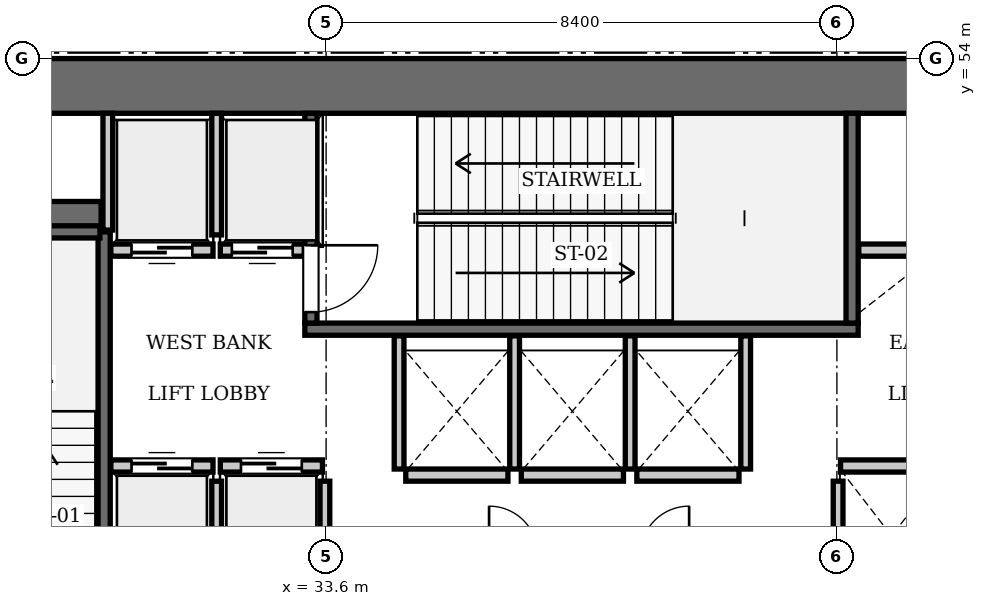
"""IFC4 building model, lengths in metres.
Left out: names, types, materials, properties, quantities, classifications, styles, units other than length and angle.
Written with IfcOpenShell. Run it as: python <this file> out.ifc"""

import sys

from ifc_helpers import new_model, si_unit, direction, frame, frame_2d, origin, place, context, subcontext, project, spatial, rectangle, extrude, element, fill, save


model = new_model("IFC4")
c1 = context("Model", 3, precision=1e-05, world=origin(), true_north=direction((0.0, 1.0)))
c2 = subcontext(c1, "Body", "Model", "MODEL_VIEW")
j1 = project(units=[si_unit("LENGTHUNIT", "METRE"), si_unit("PLANEANGLEUNIT", "RADIAN")], contexts=[c1])
p1 = place(None, origin())
s1 = spatial("IfcSite", under=j1, at=p1, CompositionType="ELEMENT")
p2 = place(p1, origin())
s2 = spatial("IfcBuilding", under=s1, at=p2, CompositionType="ELEMENT")
p3 = place(p2, frame((0.0, 0.0, 10.85)))
s3 = spatial("IfcBuildingStorey", under=s2, at=p3, CompositionType="ELEMENT", Elevation=10.85)
p4 = place(p3, frame((25.2, 53.55, 0.0), z_axis=(0.0, 0.0, 1.0), x_axis=(1.0, 0.0, 0.0)))
e1 = element("IfcWall", 1, at=p4, inside=s3, PredefinedType="SHEAR", context=c2, shape_type="SweptSolid", body=[
    extrude(rectangle(XDim=25.2, YDim=0.9, at=frame_2d((12.6, 0.0))), origin(), (0.0, 0.0, 1.0), 5.6),
])
p5 = place(p3, frame((26.1, 51.4, 0.0), z_axis=(0.0, 0.0, 1.0), x_axis=(1.0, 0.0, 0.0)))
e2 = element("IfcWall", 2, at=p5, inside=s3, PredefinedType="SHEAR", context=c2, shape_type="SweptSolid", body=[
    extrude(rectangle(XDim=3.8, YDim=0.5, at=frame_2d((1.9, 0.0))), origin(), (0.0, 0.0, 1.0), 5.6),
])
p6 = place(p3, frame((29.95, 42.3, 0.0), z_axis=(0.0, 0.0, 1.0), x_axis=(0.0, 1.0, 0.0)))
e3 = element("IfcWall", 3, at=p6, inside=s3, PredefinedType="SOLIDWALL", context=c2, shape_type="SweptSolid", body=[
    extrude(rectangle(XDim=8.85, YDim=0.2, at=frame_2d((4.425, 0.0))), origin(), (0.0, 0.0, 1.0), 5.32),
])
p7 = place(p3, frame((26.38, 51.15, 0.0), z_axis=(0.0, 0.0, 1.0), x_axis=(1.0, 0.0, 0.0)))
e4 = element("IfcWall", 4, at=p7, inside=s3, PredefinedType="SOLIDWALL", context=c2, shape_type="SweptSolid", body=[
    extrude(rectangle(XDim=3.5, YDim=0.2, at=frame_2d((1.75, 0.0))), origin(), (0.0, 0.0, 1.0), 5.32),
])
p8 = place(p3, frame((33.25, 49.55, 0.0), z_axis=(0.0, 0.0, 1.0), x_axis=(1.0, 0.0, 0.0)))
e5 = element("IfcWall", 5, at=p8, inside=s3, PredefinedType="SOLIDWALL", context=c2, shape_type="SweptSolid", body=[
    extrude(rectangle(XDim=9.1, YDim=0.2, at=frame_2d((4.55, 0.0))), origin(), (0.0, 0.0, 1.0), 5.32),
])
p9 = place(p3, frame((42.25, 49.65, 0.0), z_axis=(0.0, 0.0, 1.0), x_axis=(0.0, 1.0, 0.0)))
e6 = element("IfcWall", 6, at=p9, inside=s3, PredefinedType="SOLIDWALL", context=c2, shape_type="SweptSolid", body=[
    extrude(rectangle(XDim=3.45, YDim=0.2, at=frame_2d((1.725, 0.0))), origin(), (0.0, 0.0, 1.0), 5.32),
])
p10 = place(p3, frame((33.35, 49.65, 0.0), z_axis=(0.0, 0.0, 1.0), x_axis=(0.0, 1.0, 0.0)))
e7 = element("IfcWall", 7, at=p10, inside=s3, PredefinedType="SOLIDWALL", context=c2, shape_type="SweptSolid", body=[
    extrude(rectangle(XDim=3.45, YDim=0.2, at=frame_2d((1.725, 0.0))), origin(), (0.0, 0.0, 1.0), 5.32),
])
p11 = place(p10, frame((0.18, 0.0, 0.0)))
e8 = element("IfcOpeningElement", 8, at=p11, cuts=e7, PredefinedType="OPENING", context=c2, shape_type="SweptSolid", body=[
    extrude(rectangle(XDim=1.1, YDim=2.15, at=frame_2d((0.55, 1.075))), frame((0.0, 0.11, 0.0), z_axis=(0.0, -1.0, 0.0), x_axis=(1.0, 0.0, 0.0)), (0.0, 0.0, 1.0), 0.22),
])
p12 = place(p3, frame((30.06, 47.3, 0.0), z_axis=(0.0, 0.0, 1.0), x_axis=(1.0, 0.0, 0.0)))
e9 = element("IfcWall", 9, at=p12, inside=s3, PredefinedType="SOLIDWALL", context=c2, shape_type="SweptSolid", body=[
    extrude(rectangle(XDim=1.68, YDim=0.2, at=frame_2d((0.84, 0.0))), origin(), (0.0, 0.0, 1.0), 5.32),
])
p13 = place(p12, frame((0.34, 0.0, 0.0)))
e10 = element("IfcOpeningElement", 10, at=p13, cuts=e9, PredefinedType="OPENING", context=c2, shape_type="SweptSolid", body=[
    extrude(rectangle(XDim=1.0, YDim=2.15, at=frame_2d((0.5, 1.075))), frame((0.0, 0.11, 0.0), z_axis=(0.0, -1.0, 0.0), x_axis=(1.0, 0.0, 0.0)), (0.0, 0.0, 1.0), 0.22),
])
p14 = place(p3, frame((31.86, 47.3, 0.0), z_axis=(0.0, 0.0, 1.0), x_axis=(1.0, 0.0, 0.0)))
e11 = element("IfcWall", 11, at=p14, inside=s3, PredefinedType="SOLIDWALL", context=c2, shape_type="SweptSolid", body=[
    extrude(rectangle(XDim=1.68, YDim=0.2, at=frame_2d((0.84, 0.0))), origin(), (0.0, 0.0, 1.0), 5.32),
])
p15 = place(p14, frame((0.34, 0.0, 0.0)))
e12 = element("IfcOpeningElement", 12, at=p15, cuts=e11, PredefinedType="OPENING", context=c2, shape_type="SweptSolid", body=[
    extrude(rectangle(XDim=1.0, YDim=2.15, at=frame_2d((0.5, 1.075))), frame((0.0, 0.11, 0.0), z_axis=(0.0, -1.0, 0.0), x_axis=(1.0, 0.0, 0.0)), (0.0, 0.0, 1.0), 0.22),
])
p16 = place(p3, frame((30.06, 50.85, 0.0), z_axis=(0.0, 0.0, 1.0), x_axis=(1.0, 0.0, 0.0)))
e13 = element("IfcWall", 13, at=p16, inside=s3, PredefinedType="SOLIDWALL", context=c2, shape_type="SweptSolid", body=[
    extrude(rectangle(XDim=1.68, YDim=0.2, at=frame_2d((0.84, 0.0))), origin(), (0.0, 0.0, 1.0), 5.32),
])
p17 = place(p16, frame((0.34, 0.0, 0.0)))
e14 = element("IfcOpeningElement", 14, at=p17, cuts=e13, PredefinedType="OPENING", context=c2, shape_type="SweptSolid", body=[
    extrude(rectangle(XDim=1.0, YDim=2.15, at=frame_2d((0.5, 1.075))), frame((0.0, 0.11, 0.0), z_axis=(0.0, -1.0, 0.0), x_axis=(1.0, 0.0, 0.0)), (0.0, 0.0, 1.0), 0.22),
])
p18 = place(p3, frame((31.86, 50.85, 0.0), z_axis=(0.0, 0.0, 1.0), x_axis=(1.0, 0.0, 0.0)))
e15 = element("IfcWall", 15, at=p18, inside=s3, PredefinedType="SOLIDWALL", context=c2, shape_type="SweptSolid", body=[
    extrude(rectangle(XDim=1.38, YDim=0.2, at=frame_2d((0.69, 0.0))), origin(), (0.0, 0.0, 1.0), 5.32),
])
p19 = place(p18, frame((0.19, 0.0, 0.0)))
e16 = element("IfcOpeningElement", 16, at=p19, cuts=e15, PredefinedType="OPENING", context=c2, shape_type="SweptSolid", body=[
    extrude(rectangle(XDim=1.0, YDim=2.15, at=frame_2d((0.5, 1.075))), frame((0.0, 0.11, 0.0), z_axis=(0.0, -1.0, 0.0), x_axis=(1.0, 0.0, 0.0)), (0.0, 0.0, 1.0), 0.22),
])
p20 = place(p3, frame((42.06, 47.3, 0.0), z_axis=(0.0, 0.0, 1.0), x_axis=(1.0, 0.0, 0.0)))
e17 = element("IfcWall", 17, at=p20, inside=s3, PredefinedType="SOLIDWALL", context=c2, shape_type="SweptSolid", body=[
    extrude(rectangle(XDim=1.68, YDim=0.2, at=frame_2d((0.84, 0.0))), origin(), (0.0, 0.0, 1.0), 5.32),
])
p21 = place(p3, frame((42.36, 50.85, 0.0), z_axis=(0.0, 0.0, 1.0), x_axis=(1.0, 0.0, 0.0)))
e18 = element("IfcWall", 18, at=p21, inside=s3, PredefinedType="SOLIDWALL", context=c2, shape_type="SweptSolid", body=[
    extrude(rectangle(XDim=1.38, YDim=0.2, at=frame_2d((0.69, 0.0))), origin(), (0.0, 0.0, 1.0), 5.32),
])
p22 = place(p3, frame((34.91, 47.15, 0.0), z_axis=(0.0, 0.0, 1.0), x_axis=(1.0, 0.0, 0.0)))
e19 = element("IfcWall", 19, at=p22, inside=s3, PredefinedType="SOLIDWALL", context=c2, shape_type="SweptSolid", body=[
    extrude(rectangle(XDim=1.68, YDim=0.2, at=frame_2d((0.84, 0.0))), origin(), (0.0, 0.0, 1.0), 5.32),
])
for number, where, z_axis, x_axis in (
    (20, (36.81, 47.15, 0.0), (0.0, 0.0, 1.0), (1.0, 0.0, 0.0)),
    (21, (38.71, 47.15, 0.0), (0.0, 0.0, 1.0), (1.0, 0.0, 0.0)),
):
    element("IfcWall", number, at=place(p3, frame(where, z_axis=z_axis, x_axis=x_axis)), inside=s3, PredefinedType="SOLIDWALL", context=c2, shape_type="SweptSolid", body=[
        extrude(rectangle(XDim=1.68, YDim=0.2, at=frame_2d((0.84, 0.0))), origin(), (0.0, 0.0, 1.0), 5.32),
    ])
for number, where, z_axis, x_axis in (
    (22, (31.8, 45.1, 0.0), (0.0, 0.0, 1.0), (0.0, 1.0, 0.0)),
    (23, (33.58, 45.1, 0.0), (0.0, 0.0, 1.0), (0.0, 1.0, 0.0)),
):
    element("IfcWall", number, at=place(p3, frame(where, z_axis=z_axis, x_axis=x_axis)), inside=s3, PredefinedType="SOLIDWALL", context=c2, shape_type="SweptSolid", body=[
        extrude(rectangle(XDim=1.95, YDim=0.16, at=frame_2d((0.975, 0.0))), origin(), (0.0, 0.0, 1.0), 5.32),
    ])
p23 = place(p3, frame((30.01, 51.18, 0.0), z_axis=(0.0, 0.0, 1.0), x_axis=(0.0, 1.0, 0.0)))
e24 = element("IfcWall", 24, at=p23, inside=s3, PredefinedType="SOLIDWALL", context=c2, shape_type="SweptSolid", body=[
    extrude(rectangle(XDim=1.92, YDim=0.16, at=frame_2d((0.96, 0.0))), origin(), (0.0, 0.0, 1.0), 5.32),
])
p24 = place(p3, frame((31.8, 51.1, 0.0), z_axis=(0.0, 0.0, 1.0), x_axis=(0.0, 1.0, 0.0)))
e25 = element("IfcWall", 25, at=p24, inside=s3, PredefinedType="SOLIDWALL", context=c2, shape_type="SweptSolid", body=[
    extrude(rectangle(XDim=2.0, YDim=0.16, at=frame_2d((1.0, 0.0))), origin(), (0.0, 0.0, 1.0), 5.32),
])
p25 = place(p3, frame((42.02, 45.1, 0.0), z_axis=(0.0, 0.0, 1.0), x_axis=(0.0, 1.0, 0.0)))
e26 = element("IfcWall", 26, at=p25, inside=s3, PredefinedType="SOLIDWALL", context=c2, shape_type="SweptSolid", body=[
    extrude(rectangle(XDim=1.95, YDim=0.16, at=frame_2d((0.975, 0.0))), origin(), (0.0, 0.0, 1.0), 5.32),
])
for number, where, z_axis, x_axis in (
    (27, (34.8, 47.25, 0.0), (0.0, 0.0, 1.0), (0.0, 1.0, 0.0)),
    (28, (36.7, 47.25, 0.0), (0.0, 0.0, 1.0), (0.0, 1.0, 0.0)),
    (29, (38.6, 47.25, 0.0), (0.0, 0.0, 1.0), (0.0, 1.0, 0.0)),
    (30, (40.5, 47.25, 0.0), (0.0, 0.0, 1.0), (0.0, 1.0, 0.0)),
):
    element("IfcWall", number, at=place(p3, frame(where, z_axis=z_axis, x_axis=x_axis)), inside=s3, PredefinedType="SOLIDWALL", context=c2, shape_type="SweptSolid", body=[
        extrude(rectangle(XDim=2.19, YDim=0.16, at=frame_2d((1.095, 0.0))), origin(), (0.0, 0.0, 1.0), 5.32),
    ])
p26 = place(p11, frame((1.1, 0.0, 0.0), z_axis=(0.0, 0.0, 1.0), x_axis=(-1.0, 0.0, 0.0)))
e31 = element("IfcDoor", 31, at=p26, inside=s3, OperationType="SINGLE_SWING_LEFT", PredefinedType="DOOR", context=c2, shape_type="SweptSolid", body=[
    extrude(rectangle(XDim=1.1, YDim=2.15, at=frame_2d((0.55, 1.075))), frame((0.0, 0.025, 0.0), z_axis=(0.0, -1.0, 0.0), x_axis=(1.0, 0.0, 0.0)), (0.0, 0.0, 1.0), 0.05),
])
fill(e8, e31)
p27 = place(p13, origin())
e32 = element("IfcDoor", 32, at=p27, inside=s3, OperationType="SLIDING_TO_LEFT", PredefinedType="DOOR", context=c2, shape_type="SweptSolid", body=[
    extrude(rectangle(XDim=1.0, YDim=2.15, at=frame_2d((0.5, 1.075))), frame((0.0, 0.025, 0.0), z_axis=(0.0, -1.0, 0.0), x_axis=(1.0, 0.0, 0.0)), (0.0, 0.0, 1.0), 0.05),
])
fill(e10, e32)
p28 = place(p15, origin())
e33 = element("IfcDoor", 33, at=p28, inside=s3, OperationType="SLIDING_TO_LEFT", PredefinedType="DOOR", context=c2, shape_type="SweptSolid", body=[
    extrude(rectangle(XDim=1.0, YDim=2.15, at=frame_2d((0.5, 1.075))), frame((0.0, 0.025, 0.0), z_axis=(0.0, -1.0, 0.0), x_axis=(1.0, 0.0, 0.0)), (0.0, 0.0, 1.0), 0.05),
])
fill(e12, e33)
p29 = place(p17, frame((1.0, 0.0, 0.0), z_axis=(0.0, 0.0, 1.0), x_axis=(-1.0, 0.0, 0.0)))
e34 = element("IfcDoor", 34, at=p29, inside=s3, OperationType="SLIDING_TO_LEFT", PredefinedType="DOOR", context=c2, shape_type="SweptSolid", body=[
    extrude(rectangle(XDim=1.0, YDim=2.15, at=frame_2d((0.5, 1.075))), frame((0.0, 0.025, 0.0), z_axis=(0.0, -1.0, 0.0), x_axis=(1.0, 0.0, 0.0)), (0.0, 0.0, 1.0), 0.05),
])
fill(e14, e34)
p30 = place(p19, frame((1.0, 0.0, 0.0), z_axis=(0.0, 0.0, 1.0), x_axis=(-1.0, 0.0, 0.0)))
e35 = element("IfcDoor", 35, at=p30, inside=s3, OperationType="SLIDING_TO_LEFT", PredefinedType="DOOR", context=c2, shape_type="SweptSolid", body=[
    extrude(rectangle(XDim=1.0, YDim=2.15, at=frame_2d((0.5, 1.075))), frame((0.0, 0.025, 0.0), z_axis=(0.0, -1.0, 0.0), x_axis=(1.0, 0.0, 0.0)), (0.0, 0.0, 1.0), 0.05),
])
fill(e16, e35)
save(model, sys.argv[1])
